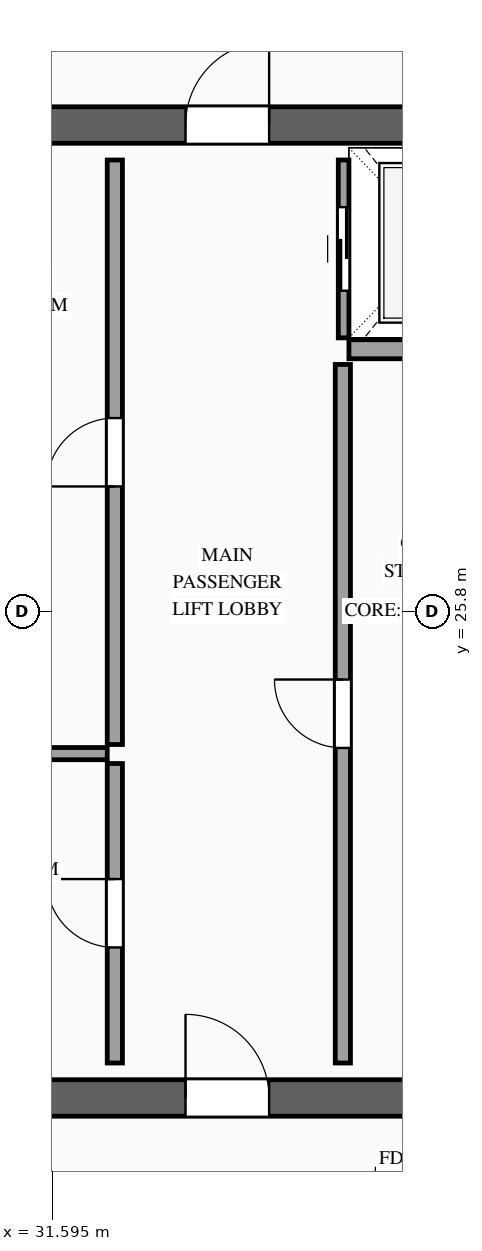
"""IFC4 building model, lengths in metres.
Left out: names, types, materials, properties, quantities, classifications, styles, units other than length and angle.
Written with IfcOpenShell. Run it as: python <this file> out.ifc"""

import sys

from ifc_helpers import new_model, si_unit, direction, frame, frame_2d, origin, place, context, subcontext, project, spatial, rectangle, extrude, source, transform, mapped, element, fill, save


model = new_model("IFC4")
c1 = context("Model", 3, precision=1e-05, world=origin(), true_north=direction((0.0, 1.0)))
c2 = subcontext(c1, "Body", "Model", "MODEL_VIEW")
j1 = project(units=[si_unit("LENGTHUNIT", "METRE"), si_unit("PLANEANGLEUNIT", "RADIAN")], contexts=[c1])
p1 = place(None, origin())
s1 = spatial("IfcSite", under=j1, at=p1, CompositionType="ELEMENT")
p2 = place(p1, origin())
s2 = spatial("IfcBuilding", under=s1, at=p2, CompositionType="ELEMENT")
p3 = place(p2, frame((0.0, 0.0, 292.6)))
s3 = spatial("IfcBuildingStorey", under=s2, at=p3, CompositionType="ELEMENT", Elevation=292.6)
p4 = place(p3, frame((23.56, 19.4, 0.0), z_axis=(0.0, 0.0, 1.0), x_axis=(1.0, 0.0, 0.0)))
e1 = element("IfcWall", 1, at=p4, inside=s3, PredefinedType="SHEAR", context=c2, shape_type="SweptSolid", body=[
    extrude(rectangle(XDim=26.88, YDim=0.48, at=frame_2d((13.44, 0.0))), origin(), (0.0, 0.0, 1.0), 3.5),
])
p5 = place(p4, frame((1.89, 0.0, 0.0)))
e2 = element("IfcOpeningElement", 2, at=p5, cuts=e1, PredefinedType="OPENING", context=c2, shape_type="SweptSolid", body=[
    extrude(rectangle(XDim=1.1, YDim=2.2, at=frame_2d((0.55, 1.1))), frame((0.0, 0.255, 0.0), z_axis=(0.0, -1.0, 0.0), x_axis=(1.0, 0.0, 0.0)), (0.0, 0.0, 1.0), 0.51),
])
p6 = place(p4, frame((9.79, 0.0, 0.0)))
e3 = element("IfcOpeningElement", 3, at=p6, cuts=e1, PredefinedType="OPENING", context=c2, shape_type="SweptSolid", body=[
    extrude(rectangle(XDim=1.1, YDim=2.2, at=frame_2d((0.55, 1.1))), frame((0.0, 0.255, 0.0), z_axis=(0.0, -1.0, 0.0), x_axis=(1.0, 0.0, 0.0)), (0.0, 0.0, 1.0), 0.51),
])
p7 = place(p4, frame((22.99, 0.0, 0.0)))
e4 = element("IfcOpeningElement", 4, at=p7, cuts=e1, PredefinedType="OPENING", context=c2, shape_type="SweptSolid", body=[
    extrude(rectangle(XDim=1.1, YDim=2.2, at=frame_2d((0.55, 1.1))), frame((0.0, 0.255, 0.0), z_axis=(0.0, -1.0, 0.0), x_axis=(1.0, 0.0, 0.0)), (0.0, 0.0, 1.0), 0.51),
])
p8 = place(p4, frame((19.61, 0.0, 0.0)))
e5 = element("IfcOpeningElement", 5, at=p8, cuts=e1, PredefinedType="OPENING", context=c2, shape_type="SweptSolid", body=[
    extrude(rectangle(XDim=0.9, YDim=2.15, at=frame_2d((0.45, 1.075))), frame((0.0, 0.255, 0.0), z_axis=(0.0, -1.0, 0.0), x_axis=(1.0, 0.0, 0.0)), (0.0, 0.0, 1.0), 0.51),
])
p9 = place(p4, frame((18.17, 0.0, 0.0)))
e6 = element("IfcOpeningElement", 6, at=p9, cuts=e1, PredefinedType="OPENING", context=c2, shape_type="SweptSolid", body=[
    extrude(rectangle(XDim=0.9, YDim=2.15, at=frame_2d((0.45, 1.075))), frame((0.0, 0.255, 0.0), z_axis=(0.0, -1.0, 0.0), x_axis=(1.0, 0.0, 0.0)), (0.0, 0.0, 1.0), 0.51),
])
p10 = place(p3, frame((23.56, 32.2, 0.0), z_axis=(0.0, 0.0, 1.0), x_axis=(1.0, 0.0, 0.0)))
e7 = element("IfcWall", 7, at=p10, inside=s3, PredefinedType="SHEAR", context=c2, shape_type="SweptSolid", body=[
    extrude(rectangle(XDim=26.88, YDim=0.48, at=frame_2d((13.44, 0.0))), origin(), (0.0, 0.0, 1.0), 3.5),
])
p11 = place(p10, frame((4.51, 0.0, 0.0)))
e8 = element("IfcOpeningElement", 8, at=p11, cuts=e7, PredefinedType="OPENING", context=c2, shape_type="SweptSolid", body=[
    extrude(rectangle(XDim=0.9, YDim=2.15, at=frame_2d((0.45, 1.075))), frame((0.0, 0.255, 0.0), z_axis=(0.0, -1.0, 0.0), x_axis=(1.0, 0.0, 0.0)), (0.0, 0.0, 1.0), 0.51),
])
p12 = place(p10, frame((9.79, 0.0, 0.0)))
e9 = element("IfcOpeningElement", 9, at=p12, cuts=e7, PredefinedType="OPENING", context=c2, shape_type="SweptSolid", body=[
    extrude(rectangle(XDim=1.1, YDim=2.2, at=frame_2d((0.55, 1.1))), frame((0.0, 0.255, 0.0), z_axis=(0.0, -1.0, 0.0), x_axis=(1.0, 0.0, 0.0)), (0.0, 0.0, 1.0), 0.51),
])
p13 = place(p10, frame((15.64, 0.0, 0.0)))
e10 = element("IfcOpeningElement", 10, at=p13, cuts=e7, PredefinedType="OPENING", context=c2, shape_type="SweptSolid", body=[
    extrude(rectangle(XDim=1.1, YDim=2.2, at=frame_2d((0.55, 1.1))), frame((0.0, 0.255, 0.0), z_axis=(0.0, -1.0, 0.0), x_axis=(1.0, 0.0, 0.0)), (0.0, 0.0, 1.0), 0.51),
])
p14 = place(p10, frame((18.74, 0.0, 0.0)))
e11 = element("IfcOpeningElement", 11, at=p14, cuts=e7, PredefinedType="OPENING", context=c2, shape_type="SweptSolid", body=[
    extrude(rectangle(XDim=1.1, YDim=2.2, at=frame_2d((0.55, 1.1))), frame((0.0, 0.255, 0.0), z_axis=(0.0, -1.0, 0.0), x_axis=(1.0, 0.0, 0.0)), (0.0, 0.0, 1.0), 0.51),
])
p15 = place(p3, frame((35.43, 29.4, 0.0), z_axis=(0.0, 0.0, 1.0), x_axis=(0.0, 1.0, 0.0)))
e12 = element("IfcWall", 12, at=p15, inside=s3, PredefinedType="SOLIDWALL", context=c2, shape_type="SweptSolid", body=[
    extrude(rectangle(XDim=2.34, YDim=0.14, at=frame_2d((1.17, 0.0))), origin(), (0.0, 0.0, 1.0), 3.28),
])
p16 = place(p15, frame((0.62, 0.0, 0.0)))
e13 = element("IfcOpeningElement", 13, at=p16, cuts=e12, PredefinedType="OPENING", context=c2, shape_type="SweptSolid", body=[
    extrude(rectangle(XDim=1.1, YDim=2.2, at=frame_2d((0.55, 1.1))), frame((0.0, 0.085, 0.0), z_axis=(0.0, -1.0, 0.0), x_axis=(1.0, 0.0, 0.0)), (0.0, 0.0, 1.0), 0.17),
])
m1 = source(origin(), c2, "Body", "SweptSolid", [
    extrude(rectangle(XDim=2.4, YDim=0.25, at=frame_2d((1.2, 0.0))), origin(), (0.0, 0.0, 1.0), 3.28),
])
p17 = place(p3, frame((35.5, 29.25, 0.0), z_axis=(0.0, 0.0, 1.0), x_axis=(1.0, 0.0, 0.0)))
e14 = element("IfcWall", 14, at=p17, inside=s3, PredefinedType="SOLIDWALL", context=c2, shape_type="MappedRepresentation", body=[
    mapped(m1, transform((0.0, 0.0, 0.0), scale=1.0)),
])
p18 = place(p3, frame((32.42, 19.86, 0.0), z_axis=(0.0, 0.0, 1.0), x_axis=(0.0, 1.0, 0.0)))
e15 = element("IfcWall", 15, at=p18, inside=s3, PredefinedType="PARTITIONING", context=c2, shape_type="SweptSolid", body=[
    extrude(rectangle(XDim=3.94, YDim=0.2, at=frame_2d((1.97, 0.0))), origin(), (0.0, 0.0, 1.0), 3.28),
])
p19 = place(p18, frame((1.52, 0.0, 0.0)))
e16 = element("IfcOpeningElement", 16, at=p19, cuts=e15, PredefinedType="OPENING", context=c2, shape_type="SweptSolid", body=[
    extrude(rectangle(XDim=0.9, YDim=2.15, at=frame_2d((0.45, 1.075))), frame((0.0, 0.115, 0.0), z_axis=(0.0, -1.0, 0.0), x_axis=(1.0, 0.0, 0.0)), (0.0, 0.0, 1.0), 0.23),
])
p20 = place(p3, frame((32.42, 24.05, 0.0), z_axis=(0.0, 0.0, 1.0), x_axis=(0.0, 1.0, 0.0)))
e17 = element("IfcWall", 17, at=p20, inside=s3, PredefinedType="PARTITIONING", context=c2, shape_type="SweptSolid", body=[
    extrude(rectangle(XDim=7.69, YDim=0.2, at=frame_2d((3.845, 0.0))), origin(), (0.0, 0.0, 1.0), 3.28),
])
p21 = place(p20, frame((3.395, 0.0, 0.0)))
e18 = element("IfcOpeningElement", 18, at=p21, cuts=e17, PredefinedType="OPENING", context=c2, shape_type="SweptSolid", body=[
    extrude(rectangle(XDim=0.9, YDim=2.15, at=frame_2d((0.45, 1.075))), frame((0.0, 0.115, 0.0), z_axis=(0.0, -1.0, 0.0), x_axis=(1.0, 0.0, 0.0)), (0.0, 0.0, 1.0), 0.23),
])
m2 = source(origin(), c2, "Body", "SweptSolid", [
    extrude(rectangle(XDim=2.47, YDim=0.16, at=frame_2d((1.235, 0.0))), origin(), (0.0, 0.0, 1.0), 3.28),
])
p22 = place(p3, frame((29.85, 23.93, 0.0), z_axis=(0.0, 0.0, 1.0), x_axis=(1.0, 0.0, 0.0)))
e19 = element("IfcWall", 19, at=p22, inside=s3, PredefinedType="PARTITIONING", context=c2, shape_type="MappedRepresentation", body=[
    mapped(m2, transform((0.0, 0.0, 0.0), scale=1.0)),
])
p23 = place(p3, frame((35.42, 19.86, 0.0), z_axis=(0.0, 0.0, 1.0), x_axis=(0.0, 1.0, 0.0)))
e20 = element("IfcWall", 20, at=p23, inside=s3, PredefinedType="PARTITIONING", context=c2, shape_type="SweptSolid", body=[
    extrude(rectangle(XDim=9.19, YDim=0.2, at=frame_2d((4.595, 0.0))), origin(), (0.0, 0.0, 1.0), 3.28),
])
p24 = place(p23, frame((4.145, 0.0, 0.0)))
e21 = element("IfcOpeningElement", 21, at=p24, cuts=e20, PredefinedType="OPENING", context=c2, shape_type="SweptSolid", body=[
    extrude(rectangle(XDim=0.9, YDim=2.15, at=frame_2d((0.45, 1.075))), frame((0.0, 0.115, 0.0), z_axis=(0.0, -1.0, 0.0), x_axis=(1.0, 0.0, 0.0)), (0.0, 0.0, 1.0), 0.23),
])
m3 = source(origin(), c2, "Body", "SweptSolid", [
    extrude(rectangle(XDim=1.1, YDim=2.2, at=frame_2d((0.55, 1.1))), frame((0.0, 0.025, 0.0), z_axis=(0.0, -1.0, 0.0), x_axis=(1.0, 0.0, 0.0)), (0.0, 0.0, 1.0), 0.05),
])
p25 = place(p16, origin())
e22 = element("IfcDoor", 22, at=p25, inside=s3, OperationType="SLIDING_TO_RIGHT", PredefinedType="DOOR", context=c2, shape_type="MappedRepresentation", body=[
    mapped(m3, transform((0.0, 0.0, 0.0), scale=1.0)),
])
fill(e13, e22)
m4 = source(origin(), c2, "Body", "SweptSolid", [
    extrude(rectangle(XDim=1.1, YDim=2.2, at=frame_2d((0.55, 1.1))), frame((0.0, 0.025, 0.0), z_axis=(0.0, -1.0, 0.0), x_axis=(1.0, 0.0, 0.0)), (0.0, 0.0, 1.0), 0.05),
])
p26 = place(p6, origin())
e23 = element("IfcDoor", 23, at=p26, inside=s3, OperationType="SINGLE_SWING_LEFT", PredefinedType="DOOR", context=c2, shape_type="MappedRepresentation", body=[
    mapped(m4, transform((0.0, 0.0, 0.0), scale=1.0)),
])
fill(e3, e23)
p27 = place(p12, origin())
e24 = element("IfcDoor", 24, at=p27, inside=s3, OperationType="SINGLE_SWING_RIGHT", PredefinedType="DOOR", context=c2, shape_type="MappedRepresentation", body=[
    mapped(m4, transform((0.0, 0.0, 0.0), scale=1.0)),
])
fill(e9, e24)
m5 = source(origin(), c2, "Body", "SweptSolid", [
    extrude(rectangle(XDim=0.9, YDim=2.15, at=frame_2d((0.45, 1.075))), frame((0.0, 0.025, 0.0), z_axis=(0.0, -1.0, 0.0), x_axis=(1.0, 0.0, 0.0)), (0.0, 0.0, 1.0), 0.05),
])
p28 = place(p19, origin())
e25 = element("IfcDoor", 25, at=p28, inside=s3, OperationType="SINGLE_SWING_RIGHT", PredefinedType="DOOR", context=c2, shape_type="MappedRepresentation", body=[
    mapped(m5, transform((0.0, 0.0, 0.0), scale=1.0)),
])
fill(e16, e25)
p29 = place(p21, origin())
e26 = element("IfcDoor", 26, at=p29, inside=s3, OperationType="SINGLE_SWING_LEFT", PredefinedType="DOOR", context=c2, shape_type="MappedRepresentation", body=[
    mapped(m5, transform((0.0, 0.0, 0.0), scale=1.0)),
])
fill(e18, e26)
p30 = place(p24, origin())
e27 = element("IfcDoor", 27, at=p30, inside=s3, OperationType="SINGLE_SWING_RIGHT", PredefinedType="DOOR", context=c2, shape_type="MappedRepresentation", body=[
    mapped(m5, transform((0.0, 0.0, 0.0), scale=1.0)),
])
fill(e21, e27)
save(model, sys.argv[1])
